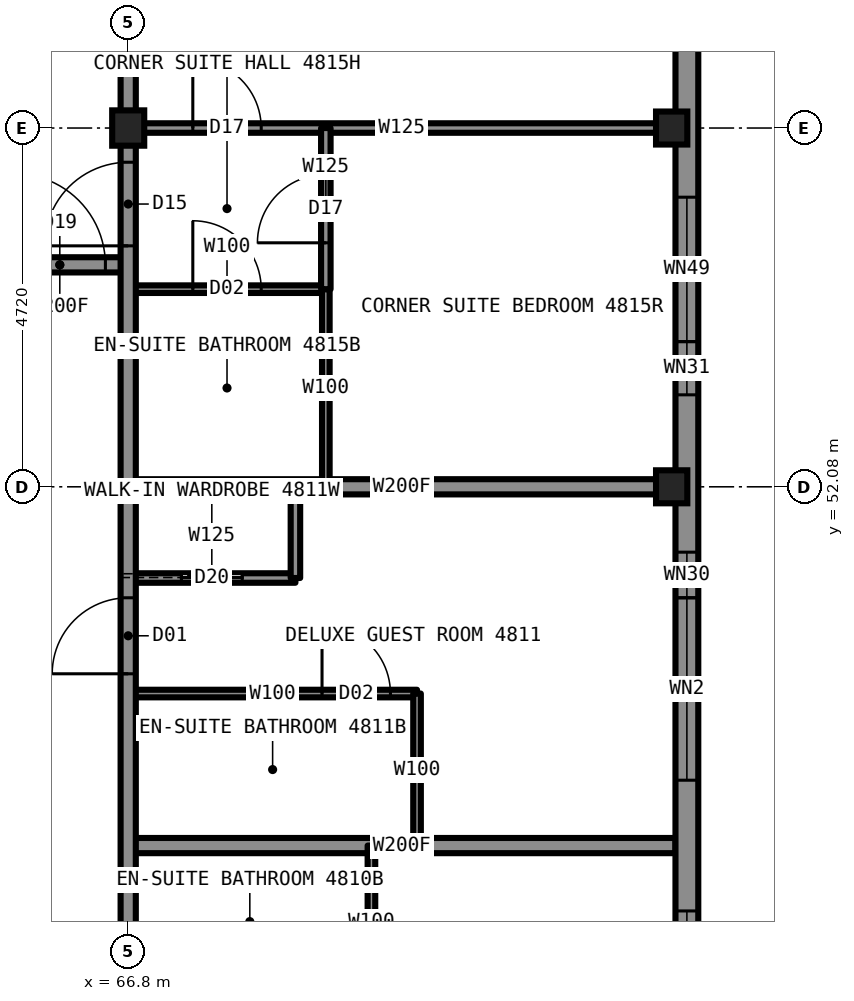
"""IFC4 building model, lengths in metres.
Left out: names, types, materials, properties, quantities, classifications, styles, units other than length and angle.
Written with IfcOpenShell. Run it as: python <this file> out.ifc"""

import sys

from ifc_helpers import new_model, si_unit, direction, frame, frame_2d, origin, origin_2d, place, context, subcontext, project, spatial, rectangle, i_section, extrude, element, fill, save


model = new_model("IFC4")
c1 = context("Model", 3, precision=1e-05, world=origin(), true_north=direction((0.0, 1.0)))
c2 = subcontext(c1, "Body", "Model", "MODEL_VIEW")
j1 = project(units=[si_unit("LENGTHUNIT", "METRE"), si_unit("PLANEANGLEUNIT", "RADIAN")], contexts=[c1])
p1 = place(None, origin())
s1 = spatial("IfcSite", under=j1, at=p1, CompositionType="ELEMENT")
p2 = place(p1, origin())
s2 = spatial("IfcBuilding", under=s1, at=p2, CompositionType="ELEMENT")
p3 = place(p2, frame((0.0, 0.0, 172.3)))
s3 = spatial("IfcBuildingStorey", under=s2, at=p3, CompositionType="ELEMENT", Elevation=172.3)
for number, where, z_axis, x_axis in (
    (1, (73.95, 52.08, 0.0), (0.0, 0.0, 1.0), (1.0, 0.0, 0.0)),
    (2, (73.95, 56.8, 0.0), (0.0, 0.0, 1.0), (1.0, 0.0, 0.0)),
):
    element("IfcColumn", number, at=place(p3, frame(where, z_axis=z_axis, x_axis=x_axis)), inside=s3, PredefinedType="COLUMN", context=c2, shape_type="SweptSolid", body=[
        extrude(i_section(OverallWidth=0.411, OverallDepth=0.434, WebThickness=0.036, FlangeThickness=0.057, at=origin_2d()), origin(), (0.0, 0.0, 1.0), 3.5),
    ])
p4 = place(p3, frame((66.8, 56.8, 0.0), z_axis=(0.0, 0.0, 1.0), x_axis=(1.0, 0.0, 0.0)))
e3 = element("IfcColumn", 3, at=p4, inside=s3, PredefinedType="COLUMN", context=c2, shape_type="SweptSolid", body=[
    extrude(i_section(OverallWidth=0.422, OverallDepth=0.465, WebThickness=0.045, FlangeThickness=0.073, at=origin_2d()), origin(), (0.0, 0.0, 1.0), 3.5),
])
p5 = place(p3, frame((65.0, 55.0, 0.0), z_axis=(0.0, 0.0, 1.0), x_axis=(1.0, 0.0, 0.0)))
e4 = element("IfcWall", 4, at=p5, inside=s3, PredefinedType="PARTITIONING", context=c2, shape_type="SweptSolid", body=[
    extrude(rectangle(XDim=1.8, YDim=0.2, at=frame_2d((0.9, 0.0))), origin(), (0.0, 0.0, 1.0), 3.33),
])
p6 = place(p5, frame((0.3, 0.0, 0.0)))
e5 = element("IfcOpeningElement", 5, at=p6, cuts=e4, PredefinedType="OPENING", context=c2, shape_type="SweptSolid", body=[
    extrude(rectangle(XDim=1.2, YDim=2.2, at=frame_2d((0.6, 1.1))), frame((0.0, 0.11, 0.0), z_axis=(0.0, -1.0, 0.0), x_axis=(1.0, 0.0, 0.0)), (0.0, 0.0, 1.0), 0.22),
])
p7 = place(p3, frame((66.8, 56.8, 0.0), z_axis=(0.0, 0.0, 1.0), x_axis=(1.0, 0.0, 0.0)))
e6 = element("IfcWall", 6, at=p7, inside=s3, PredefinedType="PARTITIONING", context=c2, shape_type="SweptSolid", body=[
    extrude(rectangle(XDim=7.2, YDim=0.125, at=frame_2d((3.6, 0.0))), origin(), (0.0, 0.0, 1.0), 2.573),
])
p8 = place(p7, frame((0.85, 0.0, 0.0)))
e7 = element("IfcOpeningElement", 7, at=p8, cuts=e6, PredefinedType="OPENING", context=c2, shape_type="SweptSolid", body=[
    extrude(rectangle(XDim=0.9, YDim=2.2, at=frame_2d((0.45, 1.1))), frame((0.0, 0.073, 0.0), z_axis=(0.0, -1.0, 0.0), x_axis=(1.0, 0.0, 0.0)), (0.0, 0.0, 1.0), 0.145),
])
p9 = place(p3, frame((66.8, 47.36, 0.0), z_axis=(0.0, 0.0, 1.0), x_axis=(1.0, 0.0, 0.0)))
e8 = element("IfcWall", 8, at=p9, inside=s3, PredefinedType="PARTITIONING", context=c2, shape_type="SweptSolid", body=[
    extrude(rectangle(XDim=7.2, YDim=0.2, at=frame_2d((3.6, 0.0))), origin(), (0.0, 0.0, 1.0), 2.73),
])
p10 = place(p3, frame((66.8, 49.36, 0.0), z_axis=(0.0, 0.0, 1.0), x_axis=(1.0, 0.0, 0.0)))
e9 = element("IfcWall", 9, at=p10, inside=s3, PredefinedType="PARTITIONING", context=c2, shape_type="SweptSolid", body=[
    extrude(rectangle(XDim=3.8, YDim=0.1, at=frame_2d((1.9, 0.0))), origin(), (0.0, 0.0, 1.0), 3.33),
])
p11 = place(p10, frame((2.55, 0.0, 0.0)))
e10 = element("IfcOpeningElement", 10, at=p11, cuts=e9, PredefinedType="OPENING", context=c2, shape_type="SweptSolid", body=[
    extrude(rectangle(XDim=0.9, YDim=2.1, at=frame_2d((0.45, 1.05))), frame((0.0, 0.06, 0.0), z_axis=(0.0, -1.0, 0.0), x_axis=(1.0, 0.0, 0.0)), (0.0, 0.0, 1.0), 0.12),
])
p12 = place(p3, frame((66.8, 50.88, 0.0), z_axis=(0.0, 0.0, 1.0), x_axis=(1.0, 0.0, 0.0)))
e11 = element("IfcWall", 11, at=p12, inside=s3, PredefinedType="PARTITIONING", context=c2, shape_type="SweptSolid", body=[
    extrude(rectangle(XDim=2.2, YDim=0.125, at=frame_2d((1.1, 0.0))), origin(), (0.0, 0.0, 1.0), 3.33),
])
p13 = place(p12, frame((0.7, 0.0, 0.0)))
e12 = element("IfcOpeningElement", 12, at=p13, cuts=e11, PredefinedType="OPENING", context=c2, shape_type="SweptSolid", body=[
    extrude(rectangle(XDim=0.8, YDim=2.1, at=frame_2d((0.4, 1.05))), frame((0.0, 0.073, 0.0), z_axis=(0.0, -1.0, 0.0), x_axis=(1.0, 0.0, 0.0)), (0.0, 0.0, 1.0), 0.145),
])
p14 = place(p3, frame((66.8, 52.08, 0.0), z_axis=(0.0, 0.0, 1.0), x_axis=(1.0, 0.0, 0.0)))
e13 = element("IfcWall", 13, at=p14, inside=s3, PredefinedType="PARTITIONING", context=c2, shape_type="SweptSolid", body=[
    extrude(rectangle(XDim=7.2, YDim=0.2, at=frame_2d((3.6, 0.0))), origin(), (0.0, 0.0, 1.0), 2.573),
])
p15 = place(p3, frame((66.8, 54.68, 0.0), z_axis=(0.0, 0.0, 1.0), x_axis=(1.0, 0.0, 0.0)))
e14 = element("IfcWall", 14, at=p15, inside=s3, PredefinedType="PARTITIONING", context=c2, shape_type="SweptSolid", body=[
    extrude(rectangle(XDim=2.6, YDim=0.1, at=frame_2d((1.3, 0.0))), origin(), (0.0, 0.0, 1.0), 3.33),
])
p16 = place(p15, frame((0.85, 0.0, 0.0)))
e15 = element("IfcOpeningElement", 15, at=p16, cuts=e14, PredefinedType="OPENING", context=c2, shape_type="SweptSolid", body=[
    extrude(rectangle(XDim=0.9, YDim=2.1, at=frame_2d((0.45, 1.05))), frame((0.0, 0.06, 0.0), z_axis=(0.0, -1.0, 0.0), x_axis=(1.0, 0.0, 0.0)), (0.0, 0.0, 1.0), 0.12),
])
p17 = place(p3, frame((66.8, 33.2, 0.0), z_axis=(0.0, 0.0, 1.0), x_axis=(0.0, 1.0, 0.0)))
e16 = element("IfcWall", 16, at=p17, inside=s3, PredefinedType="PARTITIONING", context=c2, shape_type="SweptSolid", body=[
    extrude(rectangle(XDim=23.58, YDim=0.2, at=frame_2d((11.79, 0.0))), origin(), (0.0, 0.0, 1.0), 3.33),
])
p18 = place(p17, frame((7.87, 0.0, 0.0)))
e17 = element("IfcOpeningElement", 17, at=p18, cuts=e16, PredefinedType="OPENING", context=c2, shape_type="SweptSolid", body=[
    extrude(rectangle(XDim=1.0, YDim=2.2, at=frame_2d((0.5, 1.1))), frame((0.0, 0.11, 0.0), z_axis=(0.0, -1.0, 0.0), x_axis=(1.0, 0.0, 0.0)), (0.0, 0.0, 1.0), 0.22),
])
p19 = place(p17, frame((10.9, 0.0, 0.0)))
e18 = element("IfcOpeningElement", 18, at=p19, cuts=e16, PredefinedType="OPENING", context=c2, shape_type="SweptSolid", body=[
    extrude(rectangle(XDim=1.0, YDim=2.2, at=frame_2d((0.5, 1.1))), frame((0.0, 0.11, 0.0), z_axis=(0.0, -1.0, 0.0), x_axis=(1.0, 0.0, 0.0)), (0.0, 0.0, 1.0), 0.22),
])
p20 = place(p17, frame((16.42, 0.0, 0.0)))
e19 = element("IfcOpeningElement", 19, at=p20, cuts=e16, PredefinedType="OPENING", context=c2, shape_type="SweptSolid", body=[
    extrude(rectangle(XDim=1.0, YDim=2.2, at=frame_2d((0.5, 1.1))), frame((0.0, 0.11, 0.0), z_axis=(0.0, -1.0, 0.0), x_axis=(1.0, 0.0, 0.0)), (0.0, 0.0, 1.0), 0.22),
])
p21 = place(p17, frame((22.05, 0.0, 0.0)))
e20 = element("IfcOpeningElement", 20, at=p21, cuts=e16, PredefinedType="OPENING", context=c2, shape_type="SweptSolid", body=[
    extrude(rectangle(XDim=1.1, YDim=2.2, at=frame_2d((0.55, 1.1))), frame((0.0, 0.11, 0.0), z_axis=(0.0, -1.0, 0.0), x_axis=(1.0, 0.0, 0.0)), (0.0, 0.0, 1.0), 0.22),
])
p22 = place(p17, frame((0.65, 0.0, 0.0)))
e21 = element("IfcOpeningElement", 21, at=p22, cuts=e16, PredefinedType="OPENING", context=c2, shape_type="SweptSolid", body=[
    extrude(rectangle(XDim=1.1, YDim=2.2, at=frame_2d((0.55, 1.1))), frame((0.0, 0.11, 0.0), z_axis=(0.0, -1.0, 0.0), x_axis=(1.0, 0.0, 0.0)), (0.0, 0.0, 1.0), 0.22),
])
p23 = place(p3, frame((69.0, 50.88, 0.0), z_axis=(0.0, 0.0, 1.0), x_axis=(0.0, 1.0, 0.0)))
e22 = element("IfcWall", 22, at=p23, inside=s3, PredefinedType="PARTITIONING", context=c2, shape_type="SweptSolid", body=[
    extrude(rectangle(XDim=1.2, YDim=0.125, at=frame_2d((0.6, 0.0))), origin(), (0.0, 0.0, 1.0), 3.33),
])
p24 = place(p3, frame((69.4, 52.08, 0.0), z_axis=(0.0, 0.0, 1.0), x_axis=(0.0, 1.0, 0.0)))
e23 = element("IfcWall", 23, at=p24, inside=s3, PredefinedType="PARTITIONING", context=c2, shape_type="SweptSolid", body=[
    extrude(rectangle(XDim=2.6, YDim=0.1, at=frame_2d((1.3, 0.0))), origin(), (0.0, 0.0, 1.0), 3.33),
])
p25 = place(p3, frame((69.4, 54.68, 0.0), z_axis=(0.0, 0.0, 1.0), x_axis=(0.0, 1.0, 0.0)))
e24 = element("IfcWall", 24, at=p25, inside=s3, PredefinedType="PARTITIONING", context=c2, shape_type="SweptSolid", body=[
    extrude(rectangle(XDim=2.12, YDim=0.125, at=frame_2d((1.06, 0.0))), origin(), (0.0, 0.0, 1.0), 3.33),
])
p26 = place(p25, frame((0.61, 0.0, 0.0)))
e25 = element("IfcOpeningElement", 25, at=p26, cuts=e24, PredefinedType="OPENING", context=c2, shape_type="SweptSolid", body=[
    extrude(rectangle(XDim=0.9, YDim=2.2, at=frame_2d((0.45, 1.1))), frame((0.0, 0.073, 0.0), z_axis=(0.0, -1.0, 0.0), x_axis=(1.0, 0.0, 0.0)), (0.0, 0.0, 1.0), 0.145),
])
for number, where, z_axis, x_axis in (
    (26, (70.0, 45.36, 0.0), (0.0, 0.0, 1.0), (0.0, 1.0, 0.0)),
    (27, (70.6, 47.36, 0.0), (0.0, 0.0, 1.0), (0.0, 1.0, 0.0)),
):
    element("IfcWall", number, at=place(p3, frame(where, z_axis=z_axis, x_axis=x_axis)), inside=s3, PredefinedType="PARTITIONING", context=c2, shape_type="SweptSolid", body=[
        extrude(rectangle(XDim=2.0, YDim=0.1, at=frame_2d((1.0, 0.0))), origin(), (0.0, 0.0, 1.0), 3.33),
    ])
p27 = place(p3, frame((74.15, 31.2, 0.0), z_axis=(0.0, 0.0, 1.0), x_axis=(0.0, 1.0, 0.0)))
e28 = element("IfcWall", 28, at=p27, inside=s3, PredefinedType="SOLIDWALL", context=c2, shape_type="SweptSolid", body=[
    extrude(rectangle(XDim=27.6, YDim=0.3, at=frame_2d((13.8, 0.0))), origin(), (0.0, 0.0, 1.0), 2.83),
])
p28 = place(p27, frame((3.46, 0.0, 0.3)))
e29 = element("IfcOpeningElement", 29, at=p28, cuts=e28, PredefinedType="OPENING", context=c2, shape_type="SweptSolid", body=[
    extrude(rectangle(XDim=2.4, YDim=2.0, at=frame_2d((1.2, 1.0))), frame((0.0, 0.16, 0.0), z_axis=(0.0, -1.0, 0.0), x_axis=(1.0, 0.0, 0.0)), (0.0, 0.0, 1.0), 0.32),
])
p29 = place(p27, frame((7.58, 0.0, 0.3)))
e30 = element("IfcOpeningElement", 30, at=p29, cuts=e28, PredefinedType="OPENING", context=c2, shape_type="SweptSolid", body=[
    extrude(rectangle(XDim=3.0, YDim=2.0, at=frame_2d((1.5, 1.0))), frame((0.0, 0.16, 0.0), z_axis=(0.0, -1.0, 0.0), x_axis=(1.0, 0.0, 0.0)), (0.0, 0.0, 1.0), 0.32),
])
p30 = place(p27, frame((12.3, 0.0, 0.3)))
e31 = element("IfcOpeningElement", 31, at=p30, cuts=e28, PredefinedType="OPENING", context=c2, shape_type="SweptSolid", body=[
    extrude(rectangle(XDim=3.0, YDim=2.0, at=frame_2d((1.5, 1.0))), frame((0.0, 0.16, 0.0), z_axis=(0.0, -1.0, 0.0), x_axis=(1.0, 0.0, 0.0)), (0.0, 0.0, 1.0), 0.32),
])
p31 = place(p27, frame((17.02, 0.0, 0.3)))
e32 = element("IfcOpeningElement", 32, at=p31, cuts=e28, PredefinedType="OPENING", context=c2, shape_type="SweptSolid", body=[
    extrude(rectangle(XDim=3.0, YDim=2.0, at=frame_2d((1.5, 1.0))), frame((0.0, 0.16, 0.0), z_axis=(0.0, -1.0, 0.0), x_axis=(1.0, 0.0, 0.0)), (0.0, 0.0, 1.0), 0.32),
])
p32 = place(p27, frame((21.74, 0.0, 0.3)))
e33 = element("IfcOpeningElement", 33, at=p32, cuts=e28, PredefinedType="OPENING", context=c2, shape_type="SweptSolid", body=[
    extrude(rectangle(XDim=2.4, YDim=2.0, at=frame_2d((1.2, 1.0))), frame((0.0, 0.16, 0.0), z_axis=(0.0, -1.0, 0.0), x_axis=(1.0, 0.0, 0.0)), (0.0, 0.0, 1.0), 0.32),
])
p33 = place(p27, frame((2.86, 0.0, 0.3)))
e34 = element("IfcOpeningElement", 34, at=p33, cuts=e28, PredefinedType="OPENING", context=c2, shape_type="SweptSolid", body=[
    extrude(rectangle(XDim=0.6, YDim=1.1, at=frame_2d((0.3, 0.55))), frame((0.0, 0.16, 0.0), z_axis=(0.0, -1.0, 0.0), x_axis=(1.0, 0.0, 0.0)), (0.0, 0.0, 1.0), 0.32),
])
p34 = place(p27, frame((24.14, 0.0, 0.3)))
e35 = element("IfcOpeningElement", 35, at=p34, cuts=e28, PredefinedType="OPENING", context=c2, shape_type="SweptSolid", body=[
    extrude(rectangle(XDim=0.6, YDim=1.1, at=frame_2d((0.3, 0.55))), frame((0.0, 0.16, 0.0), z_axis=(0.0, -1.0, 0.0), x_axis=(1.0, 0.0, 0.0)), (0.0, 0.0, 1.0), 0.32),
])
p35 = place(p3, frame((66.8, 56.78, 0.0), z_axis=(0.0, 0.0, 1.0), x_axis=(0.0, 1.0, 0.0)))
e36 = element("IfcWall", 36, at=p35, inside=s3, PredefinedType="PARTITIONING", context=c2, shape_type="SweptSolid", body=[
    extrude(rectangle(XDim=2.82, YDim=0.2, at=frame_2d((1.41, 0.0))), origin(), (0.0, 0.0, 1.0), 2.573),
])
p36 = place(p6, origin())
e37 = element("IfcDoor", 37, at=p36, inside=s3, OperationType="SINGLE_SWING_LEFT", PredefinedType="DOOR", context=c2, shape_type="SweptSolid", body=[
    extrude(rectangle(XDim=1.2, YDim=2.2, at=frame_2d((0.6, 1.1))), frame((0.0, 0.025, 0.0), z_axis=(0.0, -1.0, 0.0), x_axis=(1.0, 0.0, 0.0)), (0.0, 0.0, 1.0), 0.05),
])
fill(e5, e37)
p37 = place(p20, origin())
e38 = element("IfcDoor", 38, at=p37, inside=s3, OperationType="SINGLE_SWING_LEFT", PredefinedType="DOOR", context=c2, shape_type="SweptSolid", body=[
    extrude(rectangle(XDim=1.0, YDim=2.2, at=frame_2d((0.5, 1.1))), frame((0.0, 0.025, 0.0), z_axis=(0.0, -1.0, 0.0), x_axis=(1.0, 0.0, 0.0)), (0.0, 0.0, 1.0), 0.05),
])
fill(e19, e38)
p38 = place(p11, origin())
e39 = element("IfcDoor", 39, at=p38, inside=s3, OperationType="SINGLE_SWING_RIGHT", PredefinedType="DOOR", context=c2, shape_type="SweptSolid", body=[
    extrude(rectangle(XDim=0.9, YDim=2.1, at=frame_2d((0.45, 1.05))), frame((0.0, 0.025, 0.0), z_axis=(0.0, -1.0, 0.0), x_axis=(1.0, 0.0, 0.0)), (0.0, 0.0, 1.0), 0.05),
])
fill(e10, e39)
p39 = place(p13, origin())
e40 = element("IfcDoor", 40, at=p39, inside=s3, OperationType="SLIDING_TO_LEFT", PredefinedType="DOOR", context=c2, shape_type="SweptSolid", body=[
    extrude(rectangle(XDim=0.8, YDim=2.1, at=frame_2d((0.4, 1.05))), frame((0.0, 0.025, 0.0), z_axis=(0.0, -1.0, 0.0), x_axis=(1.0, 0.0, 0.0)), (0.0, 0.0, 1.0), 0.05),
])
fill(e12, e40)
p40 = place(p8, origin())
e41 = element("IfcDoor", 41, at=p40, inside=s3, OperationType="SINGLE_SWING_LEFT", PredefinedType="DOOR", context=c2, shape_type="SweptSolid", body=[
    extrude(rectangle(XDim=0.9, YDim=2.2, at=frame_2d((0.45, 1.1))), frame((0.0, 0.025, 0.0), z_axis=(0.0, -1.0, 0.0), x_axis=(1.0, 0.0, 0.0)), (0.0, 0.0, 1.0), 0.05),
])
fill(e7, e41)
p41 = place(p16, origin())
e42 = element("IfcDoor", 42, at=p41, inside=s3, OperationType="SINGLE_SWING_RIGHT", PredefinedType="DOOR", context=c2, shape_type="SweptSolid", body=[
    extrude(rectangle(XDim=0.9, YDim=2.1, at=frame_2d((0.45, 1.05))), frame((0.0, 0.025, 0.0), z_axis=(0.0, -1.0, 0.0), x_axis=(1.0, 0.0, 0.0)), (0.0, 0.0, 1.0), 0.05),
])
fill(e15, e42)
p42 = place(p21, origin())
e43 = element("IfcDoor", 43, at=p42, inside=s3, OperationType="SINGLE_SWING_LEFT", PredefinedType="DOOR", context=c2, shape_type="SweptSolid", body=[
    extrude(rectangle(XDim=1.1, YDim=2.2, at=frame_2d((0.55, 1.1))), frame((0.0, 0.025, 0.0), z_axis=(0.0, -1.0, 0.0), x_axis=(1.0, 0.0, 0.0)), (0.0, 0.0, 1.0), 0.05),
])
fill(e20, e43)
p43 = place(p26, origin())
e44 = element("IfcDoor", 44, at=p43, inside=s3, OperationType="SINGLE_SWING_LEFT", PredefinedType="DOOR", context=c2, shape_type="SweptSolid", body=[
    extrude(rectangle(XDim=0.9, YDim=2.2, at=frame_2d((0.45, 1.1))), frame((0.0, 0.025, 0.0), z_axis=(0.0, -1.0, 0.0), x_axis=(1.0, 0.0, 0.0)), (0.0, 0.0, 1.0), 0.05),
])
fill(e25, e44)
p44 = place(p30, origin())
e45 = element("IfcWindow", 45, at=p44, inside=s3, PartitioningType="SINGLE_PANEL", PredefinedType="WINDOW", context=c2, shape_type="SweptSolid", body=[
    extrude(rectangle(XDim=3.0, YDim=2.0, at=frame_2d((1.5, 1.0))), frame((0.0, 0.13, 0.0), z_axis=(0.0, -1.0, 0.0), x_axis=(1.0, 0.0, 0.0)), (0.0, 0.0, 1.0), 0.06),
])
fill(e31, e45)
p45 = place(p31, origin())
e46 = element("IfcWindow", 46, at=p45, inside=s3, PartitioningType="SINGLE_PANEL", PredefinedType="WINDOW", context=c2, shape_type="SweptSolid", body=[
    extrude(rectangle(XDim=3.0, YDim=2.0, at=frame_2d((1.5, 1.0))), frame((0.0, 0.13, 0.0), z_axis=(0.0, -1.0, 0.0), x_axis=(1.0, 0.0, 0.0)), (0.0, 0.0, 1.0), 0.06),
])
fill(e32, e46)
p46 = place(p32, origin())
e47 = element("IfcWindow", 47, at=p46, inside=s3, PartitioningType="SINGLE_PANEL", PredefinedType="WINDOW", context=c2, shape_type="SweptSolid", body=[
    extrude(rectangle(XDim=2.4, YDim=2.0, at=frame_2d((1.2, 1.0))), frame((0.0, 0.13, 0.0), z_axis=(0.0, -1.0, 0.0), x_axis=(1.0, 0.0, 0.0)), (0.0, 0.0, 1.0), 0.06),
])
fill(e33, e47)
p47 = place(p34, origin())
e48 = element("IfcWindow", 48, at=p47, inside=s3, PartitioningType="SINGLE_PANEL", PredefinedType="WINDOW", context=c2, shape_type="SweptSolid", body=[
    extrude(rectangle(XDim=0.6, YDim=1.1, at=frame_2d((0.3, 0.55))), frame((0.0, 0.13, 0.0), z_axis=(0.0, -1.0, 0.0), x_axis=(1.0, 0.0, 0.0)), (0.0, 0.0, 1.0), 0.06),
])
fill(e35, e48)
save(model, sys.argv[1])
